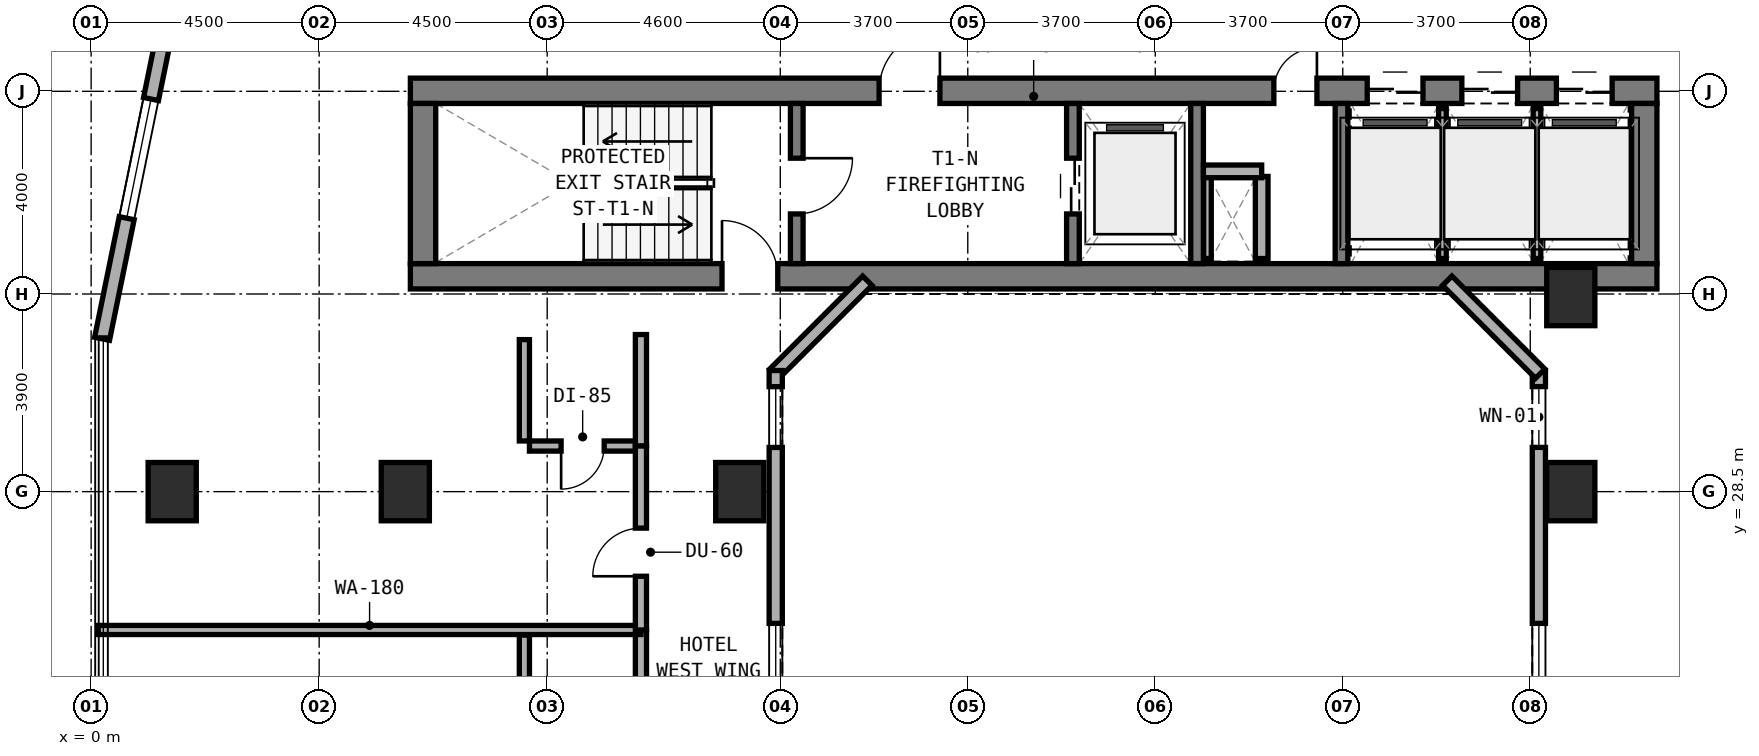
"""IFC4 building model, lengths in metres.
Left out: names, types, materials, properties, quantities, classifications, styles, units other than length and angle.
Written with IfcOpenShell. Run it as: python <this file> out.ifc"""

import sys

from ifc_helpers import new_model, si_unit, direction, frame, frame_2d, origin, origin_2d, place, context, subcontext, project, spatial, rectangle, extrude, element, fill, save


model = new_model("IFC4")
c1 = context("Model", 3, precision=1e-05, world=origin(), true_north=direction((0.0, 1.0)))
c2 = subcontext(c1, "Body", "Model", "MODEL_VIEW")
j1 = project(units=[si_unit("LENGTHUNIT", "METRE"), si_unit("PLANEANGLEUNIT", "RADIAN")], contexts=[c1])
p1 = place(None, origin())
s1 = spatial("IfcSite", under=j1, at=p1, CompositionType="ELEMENT")
p2 = place(p1, origin())
s2 = spatial("IfcBuilding", under=s1, at=p2, CompositionType="ELEMENT")
p3 = place(p2, frame((0.0, 0.0, 62.5)))
s3 = spatial("IfcBuildingStorey", under=s2, at=p3, CompositionType="ELEMENT", Elevation=62.5)
p4 = place(p3, frame((6.3, 32.75, 0.0), z_axis=(0.0, 0.0, 1.0), x_axis=(1.0, 0.0, 0.0)))
e1 = element("IfcWall", 1, at=p4, inside=s3, PredefinedType="SHEAR", context=c2, shape_type="SweptSolid", body=[
    extrude(rectangle(XDim=24.6, YDim=0.5, at=frame_2d((12.3, 0.0))), origin(), (0.0, 0.0, 1.0), 3.5),
])
p5 = place(p4, frame((6.15, 0.0, 0.0)))
e2 = element("IfcOpeningElement", 2, at=p5, cuts=e1, PredefinedType="OPENING", context=c2, shape_type="SweptSolid", body=[
    extrude(rectangle(XDim=1.1, YDim=2.15, at=frame_2d((0.55, 1.075))), frame((0.0, 0.26, 0.0), z_axis=(0.0, -1.0, 0.0), x_axis=(1.0, 0.0, 0.0)), (0.0, 0.0, 1.0), 0.52),
])
p6 = place(p3, frame((6.3, 36.41, 0.0), z_axis=(0.0, 0.0, 1.0), x_axis=(1.0, 0.0, 0.0)))
e3 = element("IfcWall", 3, at=p6, inside=s3, PredefinedType="SHEAR", context=c2, shape_type="SweptSolid", body=[
    extrude(rectangle(XDim=24.6, YDim=0.5, at=frame_2d((12.3, 0.0))), origin(), (0.0, 0.0, 1.0), 3.5),
])
p7 = place(p6, frame((9.25, 0.0, 0.0)))
e4 = element("IfcOpeningElement", 4, at=p7, cuts=e3, PredefinedType="OPENING", context=c2, shape_type="SweptSolid", body=[
    extrude(rectangle(XDim=1.2, YDim=2.15, at=frame_2d((0.6, 1.075))), frame((0.0, 0.26, 0.0), z_axis=(0.0, -1.0, 0.0), x_axis=(1.0, 0.0, 0.0)), (0.0, 0.0, 1.0), 0.52),
])
p8 = place(p6, frame((17.04, 0.0, 0.0)))
e5 = element("IfcOpeningElement", 5, at=p8, cuts=e3, PredefinedType="OPENING", context=c2, shape_type="SweptSolid", body=[
    extrude(rectangle(XDim=0.85, YDim=2.1, at=frame_2d((0.425, 1.05))), frame((0.0, 0.26, 0.0), z_axis=(0.0, -1.0, 0.0), x_axis=(1.0, 0.0, 0.0)), (0.0, 0.0, 1.0), 0.52),
])
p9 = place(p6, frame((18.883, 0.0, 0.0)))
e6 = element("IfcOpeningElement", 6, at=p9, cuts=e3, PredefinedType="OPENING", context=c2, shape_type="SweptSolid", body=[
    extrude(rectangle(XDim=1.1, YDim=2.15, at=frame_2d((0.55, 1.075))), frame((0.0, 0.26, 0.0), z_axis=(0.0, -1.0, 0.0), x_axis=(1.0, 0.0, 0.0)), (0.0, 0.0, 1.0), 0.52),
])
p10 = place(p6, frame((20.75, 0.0, 0.0)))
e7 = element("IfcOpeningElement", 7, at=p10, cuts=e3, PredefinedType="OPENING", context=c2, shape_type="SweptSolid", body=[
    extrude(rectangle(XDim=1.1, YDim=2.15, at=frame_2d((0.55, 1.075))), frame((0.0, 0.26, 0.0), z_axis=(0.0, -1.0, 0.0), x_axis=(1.0, 0.0, 0.0)), (0.0, 0.0, 1.0), 0.52),
])
p11 = place(p6, frame((22.616, 0.0, 0.0)))
e8 = element("IfcOpeningElement", 8, at=p11, cuts=e3, PredefinedType="OPENING", context=c2, shape_type="SweptSolid", body=[
    extrude(rectangle(XDim=1.1, YDim=2.15, at=frame_2d((0.55, 1.075))), frame((0.0, 0.26, 0.0), z_axis=(0.0, -1.0, 0.0), x_axis=(1.0, 0.0, 0.0)), (0.0, 0.0, 1.0), 0.52),
])
for number, where, z_axis, x_axis in (
    (9, (6.55, 33.0, 0.0), (0.0, 0.0, 1.0), (0.0, 1.0, 0.0)),
    (10, (30.65, 33.0, 0.0), (0.0, 0.0, 1.0), (0.0, 1.0, 0.0)),
):
    element("IfcWall", number, at=place(p3, frame(where, z_axis=z_axis, x_axis=x_axis)), inside=s3, PredefinedType="SHEAR", context=c2, shape_type="SweptSolid", body=[
        extrude(rectangle(XDim=3.16, YDim=0.5, at=frame_2d((1.58, 0.0))), origin(), (0.0, 0.0, 1.0), 3.5),
    ])
p12 = place(p3, frame((13.925, 33.0, 0.0), z_axis=(0.0, 0.0, 1.0), x_axis=(0.0, 1.0, 0.0)))
e11 = element("IfcWall", 11, at=p12, inside=s3, PredefinedType="STANDARD", context=c2, shape_type="SweptSolid", body=[
    extrude(rectangle(XDim=3.16, YDim=0.25, at=frame_2d((1.58, 0.0))), origin(), (0.0, 0.0, 1.0), 3.22),
])
p13 = place(p12, frame((0.98, 0.0, 0.0)))
e12 = element("IfcOpeningElement", 12, at=p13, cuts=e11, PredefinedType="OPENING", context=c2, shape_type="SweptSolid", body=[
    extrude(rectangle(XDim=1.1, YDim=2.15, at=frame_2d((0.55, 1.075))), frame((0.0, 0.135, 0.0), z_axis=(0.0, -1.0, 0.0), x_axis=(1.0, 0.0, 0.0)), (0.0, 0.0, 1.0), 0.27),
])
p14 = place(p3, frame((19.375, 33.0, 0.0), z_axis=(0.0, 0.0, 1.0), x_axis=(0.0, 1.0, 0.0)))
e13 = element("IfcWall", 13, at=p14, inside=s3, PredefinedType="STANDARD", context=c2, shape_type="SweptSolid", body=[
    extrude(rectangle(XDim=3.16, YDim=0.25, at=frame_2d((1.58, 0.0))), origin(), (0.0, 0.0, 1.0), 3.22),
])
p15 = place(p14, frame((0.98, 0.0, 0.0)))
e14 = element("IfcOpeningElement", 14, at=p15, cuts=e13, PredefinedType="OPENING", context=c2, shape_type="SweptSolid", body=[
    extrude(rectangle(XDim=1.1, YDim=2.15, at=frame_2d((0.55, 1.075))), frame((0.0, 0.135, 0.0), z_axis=(0.0, -1.0, 0.0), x_axis=(1.0, 0.0, 0.0)), (0.0, 0.0, 1.0), 0.27),
])
for number, where, z_axis, x_axis in (
    (15, (21.825, 33.0, 0.0), (0.0, 0.0, 1.0), (0.0, 1.0, 0.0)),
    (16, (24.675, 33.0, 0.0), (0.0, 0.0, 1.0), (0.0, 1.0, 0.0)),
):
    element("IfcWall", number, at=place(p3, frame(where, z_axis=z_axis, x_axis=x_axis)), inside=s3, PredefinedType="STANDARD", context=c2, shape_type="SweptSolid", body=[
        extrude(rectangle(XDim=3.16, YDim=0.25, at=frame_2d((1.58, 0.0))), origin(), (0.0, 0.0, 1.0), 3.22),
    ])
for number, where, z_axis, x_axis in (
    (17, (6.2, 28.5, 0.0), (0.0, 0.0, 1.0), (1.0, 0.0, 0.0)),
    (18, (12.8, 28.5, 0.0), (0.0, 0.0, 1.0), (1.0, 0.0, 0.0)),
    (19, (29.2, 32.35, 0.0), (0.0, 0.0, 1.0), (1.0, 0.0, 0.0)),
    (20, (29.2, 28.5, 0.0), (0.0, 0.0, 1.0), (1.0, 0.0, 0.0)),
    (21, (1.6, 28.5, 0.0), (0.0, 0.0, 1.0), (1.0, 0.0, 0.0)),
):
    element("IfcColumn", number, at=place(p3, frame(where, z_axis=z_axis, x_axis=x_axis)), inside=s3, PredefinedType="COLUMN", context=c2, shape_type="SweptSolid", body=[
        extrude(rectangle(XDim=0.95, YDim=1.15, at=origin_2d()), origin(), (0.0, 0.0, 1.0), 3.5),
    ])
p16 = place(p3, frame((2.229, 41.378, 0.0), z_axis=(0.0, 0.0, 1.0), x_axis=(-0.199990901713, -0.979797754249, 0.0)))
e22 = element("IfcWall", 22, at=p16, inside=s3, PredefinedType="STANDARD", context=c2, shape_type="SweptSolid", body=[
    extrude(rectangle(XDim=10.065, YDim=0.3, at=frame_2d((5.033, 0.0))), origin(), (0.0, 0.0, 1.0), 3.22),
])
p17 = place(p16, frame((0.378, 0.0, 0.85)))
e23 = element("IfcOpeningElement", 23, at=p17, cuts=e22, PredefinedType="OPENING", context=c2, shape_type="SweptSolid", body=[
    extrude(rectangle(XDim=1.8, YDim=1.5, at=frame_2d((0.9, 0.75))), frame((0.0, 0.16, 0.0), z_axis=(0.0, -1.0, 0.0), x_axis=(1.0, 0.0, 0.0)), (0.0, 0.0, 1.0), 0.32),
])
p18 = place(p16, frame((5.236, 0.0, 0.8)))
e24 = element("IfcOpeningElement", 24, at=p18, cuts=e22, PredefinedType="OPENING", context=c2, shape_type="SweptSolid", body=[
    extrude(rectangle(XDim=2.4, YDim=1.6, at=frame_2d((1.2, 0.8))), frame((0.0, 0.16, 0.0), z_axis=(0.0, -1.0, 0.0), x_axis=(1.0, 0.0, 0.0)), (0.0, 0.0, 1.0), 0.32),
])
p19 = place(p3, frame((28.57, 19.11, 0.0), z_axis=(0.0, 0.0, 1.0), x_axis=(0.0, 1.0, 0.0)))
e25 = element("IfcWall", 25, at=p19, inside=s3, PredefinedType="STANDARD", context=c2, shape_type="SweptSolid", body=[
    extrude(rectangle(XDim=11.78, YDim=0.26, at=frame_2d((5.89, 0.0))), origin(), (0.0, 0.0, 1.0), 3.22),
])
p20 = place(p19, frame((0.318, 0.0, 0.85)))
e26 = element("IfcOpeningElement", 26, at=p20, cuts=e25, PredefinedType="OPENING", context=c2, shape_type="SweptSolid", body=[
    extrude(rectangle(XDim=1.2, YDim=1.5, at=frame_2d((0.6, 0.75))), frame((0.0, 0.14, 0.0), z_axis=(0.0, -1.0, 0.0), x_axis=(1.0, 0.0, 0.0)), (0.0, 0.0, 1.0), 0.28),
])
p21 = place(p19, frame((4.99, 0.0, 0.85)))
e27 = element("IfcOpeningElement", 27, at=p21, cuts=e25, PredefinedType="OPENING", context=c2, shape_type="SweptSolid", body=[
    extrude(rectangle(XDim=1.8, YDim=1.5, at=frame_2d((0.9, 0.75))), frame((0.0, 0.14, 0.0), z_axis=(0.0, -1.0, 0.0), x_axis=(1.0, 0.0, 0.0)), (0.0, 0.0, 1.0), 0.28),
])
p22 = place(p19, frame((10.263, 0.0, 0.85)))
e28 = element("IfcOpeningElement", 28, at=p22, cuts=e25, PredefinedType="OPENING", context=c2, shape_type="SweptSolid", body=[
    extrude(rectangle(XDim=1.2, YDim=1.5, at=frame_2d((0.6, 0.75))), frame((0.0, 0.14, 0.0), z_axis=(0.0, -1.0, 0.0), x_axis=(1.0, 0.0, 0.0)), (0.0, 0.0, 1.0), 0.28),
])
p23 = place(p3, frame((28.596, 30.828, 0.0), z_axis=(0.0, 0.0, 1.0), x_axis=(-0.707059717605, 0.707153841636, 0.0)))
e29 = element("IfcWall", 29, at=p23, inside=s3, PredefinedType="STANDARD", context=c2, shape_type="SweptSolid", body=[
    extrude(rectangle(XDim=2.594, YDim=0.26, at=frame_2d((1.297, 0.0))), origin(), (0.0, 0.0, 1.0), 3.22),
])
p24 = place(p3, frame((15.318, 32.662, 0.0), z_axis=(0.0, 0.0, 1.0), x_axis=(-0.707106781187, -0.707106781187, 0.0)))
e30 = element("IfcWall", 30, at=p24, inside=s3, PredefinedType="STANDARD", context=c2, shape_type="SweptSolid", body=[
    extrude(rectangle(XDim=2.594, YDim=0.26, at=frame_2d((1.297, 0.0))), origin(), (0.0, 0.0, 1.0), 3.22),
])
p25 = place(p3, frame((13.51, 30.89, 0.0), z_axis=(0.0, 0.0, 1.0), x_axis=(0.0, -1.0, 0.0)))
e31 = element("IfcWall", 31, at=p25, inside=s3, PredefinedType="STANDARD", context=c2, shape_type="SweptSolid", body=[
    extrude(rectangle(XDim=11.78, YDim=0.26, at=frame_2d((5.89, 0.0))), origin(), (0.0, 0.0, 1.0), 3.22),
])
p26 = place(p25, frame((0.318, 0.0, 0.85)))
e32 = element("IfcOpeningElement", 32, at=p26, cuts=e31, PredefinedType="OPENING", context=c2, shape_type="SweptSolid", body=[
    extrude(rectangle(XDim=1.2, YDim=1.5, at=frame_2d((0.6, 0.75))), frame((0.0, 0.14, 0.0), z_axis=(0.0, -1.0, 0.0), x_axis=(1.0, 0.0, 0.0)), (0.0, 0.0, 1.0), 0.28),
])
p27 = place(p25, frame((4.99, 0.0, 0.85)))
e33 = element("IfcOpeningElement", 33, at=p27, cuts=e31, PredefinedType="OPENING", context=c2, shape_type="SweptSolid", body=[
    extrude(rectangle(XDim=1.8, YDim=1.5, at=frame_2d((0.9, 0.75))), frame((0.0, 0.14, 0.0), z_axis=(0.0, -1.0, 0.0), x_axis=(1.0, 0.0, 0.0)), (0.0, 0.0, 1.0), 0.28),
])
p28 = place(p25, frame((10.263, 0.0, 0.85)))
e34 = element("IfcOpeningElement", 34, at=p28, cuts=e31, PredefinedType="OPENING", context=c2, shape_type="SweptSolid", body=[
    extrude(rectangle(XDim=1.2, YDim=1.5, at=frame_2d((0.6, 0.75))), frame((0.0, 0.14, 0.0), z_axis=(0.0, -1.0, 0.0), x_axis=(1.0, 0.0, 0.0)), (0.0, 0.0, 1.0), 0.28),
])
p29 = place(p3, frame((22.03, 33.1, 0.0), z_axis=(0.0, 0.0, 1.0), x_axis=(0.0, 1.0, 0.0)))
e35 = element("IfcWall", 35, at=p29, inside=s3, PredefinedType="PARTITIONING", context=c2, shape_type="SweptSolid", body=[
    extrude(rectangle(XDim=1.62, YDim=0.15, at=frame_2d((0.81, 0.0))), origin(), (0.0, 0.0, 1.0), 3.22),
])
p30 = place(p3, frame((23.1, 33.1, 0.0), z_axis=(0.0, 0.0, 1.0), x_axis=(0.0, 1.0, 0.0)))
e36 = element("IfcWall", 36, at=p30, inside=s3, PredefinedType="SOLIDWALL", context=c2, shape_type="SweptSolid", body=[
    extrude(rectangle(XDim=1.62, YDim=0.25, at=frame_2d((0.81, 0.0))), origin(), (0.0, 0.0, 1.0), 3.22),
])
p31 = place(p3, frame((21.95, 34.82, 0.0), z_axis=(0.0, 0.0, 1.0), x_axis=(1.0, 0.0, 0.0)))
e37 = element("IfcWall", 37, at=p31, inside=s3, PredefinedType="SOLIDWALL", context=c2, shape_type="SweptSolid", body=[
    extrude(rectangle(XDim=1.15, YDim=0.25, at=frame_2d((0.575, 0.0))), origin(), (0.0, 0.0, 1.0), 3.22),
])
p32 = place(p3, frame((26.667, 33.1, 0.0), z_axis=(0.0, 0.0, 1.0), x_axis=(0.0, 1.0, 0.0)))
e38 = element("IfcWall", 38, at=p32, inside=s3, PredefinedType="PARTITIONING", context=c2, shape_type="SweptSolid", body=[
    extrude(rectangle(XDim=2.96, YDim=0.15, at=frame_2d((1.48, 0.0))), origin(), (0.0, 0.0, 1.0), 3.22),
])
p33 = place(p3, frame((28.533, 33.1, 0.0), z_axis=(0.0, 0.0, 1.0), x_axis=(0.0, 1.0, 0.0)))
e39 = element("IfcWall", 39, at=p33, inside=s3, PredefinedType="PARTITIONING", context=c2, shape_type="SweptSolid", body=[
    extrude(rectangle(XDim=2.96, YDim=0.15, at=frame_2d((1.48, 0.0))), origin(), (0.0, 0.0, 1.0), 2.495),
])
p34 = place(p3, frame((8.55, 23.67, 0.0), z_axis=(0.0, 0.0, 1.0), x_axis=(0.0, 1.0, 0.0)))
e40 = element("IfcWall", 40, at=p34, inside=s3, PredefinedType="PLUMBINGWALL", context=c2, shape_type="SweptSolid", body=[
    extrude(rectangle(XDim=2.0, YDim=0.2, at=frame_2d((1.0, 0.0))), origin(), (0.0, 0.0, 1.0), 3.22),
])
p35 = place(p3, frame((10.85, 23.57, 0.0), z_axis=(0.0, 0.0, 1.0), x_axis=(0.0, 1.0, 0.0)))
e41 = element("IfcWall", 41, at=p35, inside=s3, PredefinedType="SOLIDWALL", context=c2, shape_type="SweptSolid", body=[
    extrude(rectangle(XDim=2.2, YDim=0.22, at=frame_2d((1.1, 0.0))), origin(), (0.0, 0.0, 1.0), 3.22),
])
p36 = place(p3, frame((0.14, 25.77, 0.0), z_axis=(0.0, 0.0, 1.0), x_axis=(1.0, 0.0, 0.0)))
e42 = element("IfcWall", 42, at=p36, inside=s3, PredefinedType="SOLIDWALL", context=c2, shape_type="SweptSolid", body=[
    extrude(rectangle(XDim=10.71, YDim=0.18, at=frame_2d((5.355, 0.0))), origin(), (0.0, 0.0, 1.0), 2.745),
])
p37 = place(p3, frame((8.65, 29.4, 0.0), z_axis=(0.0, 0.0, 1.0), x_axis=(1.0, 0.0, 0.0)))
e43 = element("IfcWall", 43, at=p37, inside=s3, PredefinedType="PLUMBINGWALL", context=c2, shape_type="SweptSolid", body=[
    extrude(rectangle(XDim=2.1, YDim=0.2, at=frame_2d((1.05, 0.0))), origin(), (0.0, 0.0, 1.0), 3.22),
])
p38 = place(p37, frame((0.625, 0.0, 0.0)))
e44 = element("IfcOpeningElement", 44, at=p38, cuts=e43, PredefinedType="OPENING", context=c2, shape_type="SweptSolid", body=[
    extrude(rectangle(XDim=0.85, YDim=2.1, at=frame_2d((0.425, 1.05))), frame((0.0, 0.11, 0.0), z_axis=(0.0, -1.0, 0.0), x_axis=(1.0, 0.0, 0.0)), (0.0, 0.0, 1.0), 0.22),
])
p39 = place(p3, frame((8.55, 29.5, 0.0), z_axis=(0.0, 0.0, 1.0), x_axis=(0.0, 1.0, 0.0)))
e45 = element("IfcWall", 45, at=p39, inside=s3, PredefinedType="PLUMBINGWALL", context=c2, shape_type="SweptSolid", body=[
    extrude(rectangle(XDim=2.0, YDim=0.2, at=frame_2d((1.0, 0.0))), origin(), (0.0, 0.0, 1.0), 3.22),
])
p40 = place(p3, frame((10.85, 29.4, 0.0), z_axis=(0.0, 0.0, 1.0), x_axis=(0.0, 1.0, 0.0)))
e46 = element("IfcWall", 46, at=p40, inside=s3, PredefinedType="SOLIDWALL", context=c2, shape_type="SweptSolid", body=[
    extrude(rectangle(XDim=2.2, YDim=0.22, at=frame_2d((1.1, 0.0))), origin(), (0.0, 0.0, 1.0), 3.22),
])
p41 = place(p3, frame((10.85, 25.77, 0.0), z_axis=(0.0, 0.0, 1.0), x_axis=(0.0, 1.0, 0.0)))
e47 = element("IfcWall", 47, at=p41, inside=s3, PredefinedType="SOLIDWALL", context=c2, shape_type="SweptSolid", body=[
    extrude(rectangle(XDim=3.63, YDim=0.22, at=frame_2d((1.815, 0.0))), origin(), (0.0, 0.0, 1.0), 2.495),
])
p42 = place(p41, frame((1.06, 0.0, 0.0)))
e48 = element("IfcOpeningElement", 48, at=p42, cuts=e47, PredefinedType="OPENING", context=c2, shape_type="SweptSolid", body=[
    extrude(rectangle(XDim=0.95, YDim=2.1, at=frame_2d((0.475, 1.05))), frame((0.0, 0.12, 0.0), z_axis=(0.0, -1.0, 0.0), x_axis=(1.0, 0.0, 0.0)), (0.0, 0.0, 1.0), 0.24),
])
p43 = place(p18, origin())
e49 = element("IfcWindow", 49, at=p43, inside=s3, PartitioningType="SINGLE_PANEL", PredefinedType="WINDOW", context=c2, shape_type="SweptSolid", body=[
    extrude(rectangle(XDim=2.4, YDim=1.6, at=frame_2d((1.2, 0.8))), frame((0.0, 0.03, 0.0), z_axis=(0.0, -1.0, 0.0), x_axis=(1.0, 0.0, 0.0)), (0.0, 0.0, 1.0), 0.06),
])
fill(e24, e49)
p44 = place(p21, origin())
e50 = element("IfcWindow", 50, at=p44, inside=s3, PartitioningType="SINGLE_PANEL", PredefinedType="WINDOW", context=c2, shape_type="SweptSolid", body=[
    extrude(rectangle(XDim=1.8, YDim=1.5, at=frame_2d((0.9, 0.75))), frame((0.0, 0.03, 0.0), z_axis=(0.0, -1.0, 0.0), x_axis=(1.0, 0.0, 0.0)), (0.0, 0.0, 1.0), 0.06),
])
fill(e27, e50)
p45 = place(p22, origin())
e51 = element("IfcWindow", 51, at=p45, inside=s3, PartitioningType="SINGLE_PANEL", PredefinedType="WINDOW", context=c2, shape_type="SweptSolid", body=[
    extrude(rectangle(XDim=1.2, YDim=1.5, at=frame_2d((0.6, 0.75))), frame((0.0, 0.03, 0.0), z_axis=(0.0, -1.0, 0.0), x_axis=(1.0, 0.0, 0.0)), (0.0, 0.0, 1.0), 0.06),
])
fill(e28, e51)
p46 = place(p26, origin())
e52 = element("IfcWindow", 52, at=p46, inside=s3, PartitioningType="SINGLE_PANEL", PredefinedType="WINDOW", context=c2, shape_type="SweptSolid", body=[
    extrude(rectangle(XDim=1.2, YDim=1.5, at=frame_2d((0.6, 0.75))), frame((0.0, 0.03, 0.0), z_axis=(0.0, -1.0, 0.0), x_axis=(1.0, 0.0, 0.0)), (0.0, 0.0, 1.0), 0.06),
])
fill(e32, e52)
p47 = place(p27, origin())
e53 = element("IfcWindow", 53, at=p47, inside=s3, PartitioningType="SINGLE_PANEL", PredefinedType="WINDOW", context=c2, shape_type="SweptSolid", body=[
    extrude(rectangle(XDim=1.8, YDim=1.5, at=frame_2d((0.9, 0.75))), frame((0.0, 0.03, 0.0), z_axis=(0.0, -1.0, 0.0), x_axis=(1.0, 0.0, 0.0)), (0.0, 0.0, 1.0), 0.06),
])
fill(e33, e53)
p48 = place(p13, frame((1.1, 0.0, 0.0), z_axis=(0.0, 0.0, 1.0), x_axis=(-1.0, 0.0, 0.0)))
e54 = element("IfcDoor", 54, at=p48, inside=s3, OperationType="SINGLE_SWING_LEFT", PredefinedType="DOOR", context=c2, shape_type="SweptSolid", body=[
    extrude(rectangle(XDim=1.1, YDim=2.15, at=frame_2d((0.55, 1.075))), frame((0.0, 0.025, 0.0), z_axis=(0.0, -1.0, 0.0), x_axis=(1.0, 0.0, 0.0)), (0.0, 0.0, 1.0), 0.05),
])
fill(e12, e54)
p49 = place(p7, origin())
e55 = element("IfcDoor", 55, at=p49, inside=s3, OperationType="SINGLE_SWING_RIGHT", PredefinedType="DOOR", context=c2, shape_type="SweptSolid", body=[
    extrude(rectangle(XDim=1.2, YDim=2.15, at=frame_2d((0.6, 1.075))), frame((0.0, 0.025, 0.0), z_axis=(0.0, -1.0, 0.0), x_axis=(1.0, 0.0, 0.0)), (0.0, 0.0, 1.0), 0.05),
])
fill(e4, e55)
p50 = place(p15, origin())
e56 = element("IfcDoor", 56, at=p50, inside=s3, OperationType="DOUBLE_DOOR_SLIDING", PredefinedType="DOOR", context=c2, shape_type="SweptSolid", body=[
    extrude(rectangle(XDim=1.1, YDim=2.15, at=frame_2d((0.55, 1.075))), frame((0.0, 0.025, 0.0), z_axis=(0.0, -1.0, 0.0), x_axis=(1.0, 0.0, 0.0)), (0.0, 0.0, 1.0), 0.05),
])
fill(e14, e56)
p51 = place(p8, origin())
e57 = element("IfcDoor", 57, at=p51, inside=s3, OperationType="SINGLE_SWING_RIGHT", PredefinedType="DOOR", context=c2, shape_type="SweptSolid", body=[
    extrude(rectangle(XDim=0.85, YDim=2.1, at=frame_2d((0.425, 1.05))), frame((0.0, 0.025, 0.0), z_axis=(0.0, -1.0, 0.0), x_axis=(1.0, 0.0, 0.0)), (0.0, 0.0, 1.0), 0.05),
])
fill(e5, e57)
p52 = place(p9, origin())
e58 = element("IfcDoor", 58, at=p52, inside=s3, OperationType="DOUBLE_DOOR_SLIDING", PredefinedType="DOOR", context=c2, shape_type="SweptSolid", body=[
    extrude(rectangle(XDim=1.1, YDim=2.15, at=frame_2d((0.55, 1.075))), frame((0.0, 0.025, 0.0), z_axis=(0.0, -1.0, 0.0), x_axis=(1.0, 0.0, 0.0)), (0.0, 0.0, 1.0), 0.05),
])
fill(e6, e58)
p53 = place(p10, origin())
e59 = element("IfcDoor", 59, at=p53, inside=s3, OperationType="DOUBLE_DOOR_SLIDING", PredefinedType="DOOR", context=c2, shape_type="SweptSolid", body=[
    extrude(rectangle(XDim=1.1, YDim=2.15, at=frame_2d((0.55, 1.075))), frame((0.0, 0.025, 0.0), z_axis=(0.0, -1.0, 0.0), x_axis=(1.0, 0.0, 0.0)), (0.0, 0.0, 1.0), 0.05),
])
fill(e7, e59)
p54 = place(p11, origin())
e60 = element("IfcDoor", 60, at=p54, inside=s3, OperationType="DOUBLE_DOOR_SLIDING", PredefinedType="DOOR", context=c2, shape_type="SweptSolid", body=[
    extrude(rectangle(XDim=1.1, YDim=2.15, at=frame_2d((0.55, 1.075))), frame((0.0, 0.025, 0.0), z_axis=(0.0, -1.0, 0.0), x_axis=(1.0, 0.0, 0.0)), (0.0, 0.0, 1.0), 0.05),
])
fill(e8, e60)
p55 = place(p5, origin())
e61 = element("IfcDoor", 61, at=p55, inside=s3, OperationType="SINGLE_SWING_LEFT", PredefinedType="DOOR", context=c2, shape_type="SweptSolid", body=[
    extrude(rectangle(XDim=1.1, YDim=2.15, at=frame_2d((0.55, 1.075))), frame((0.0, 0.025, 0.0), z_axis=(0.0, -1.0, 0.0), x_axis=(1.0, 0.0, 0.0)), (0.0, 0.0, 1.0), 0.05),
])
fill(e2, e61)
p56 = place(p38, frame((0.85, 0.0, 0.0), z_axis=(0.0, 0.0, 1.0), x_axis=(-1.0, 0.0, 0.0)))
e62 = element("IfcDoor", 62, at=p56, inside=s3, OperationType="SINGLE_SWING_RIGHT", PredefinedType="DOOR", context=c2, shape_type="SweptSolid", body=[
    extrude(rectangle(XDim=0.85, YDim=2.1, at=frame_2d((0.425, 1.05))), frame((0.0, 0.025, 0.0), z_axis=(0.0, -1.0, 0.0), x_axis=(1.0, 0.0, 0.0)), (0.0, 0.0, 1.0), 0.05),
])
fill(e44, e62)
p57 = place(p42, origin())
e63 = element("IfcDoor", 63, at=p57, inside=s3, OperationType="SINGLE_SWING_LEFT", PredefinedType="DOOR", context=c2, shape_type="SweptSolid", body=[
    extrude(rectangle(XDim=0.95, YDim=2.1, at=frame_2d((0.475, 1.05))), frame((0.0, 0.025, 0.0), z_axis=(0.0, -1.0, 0.0), x_axis=(1.0, 0.0, 0.0)), (0.0, 0.0, 1.0), 0.05),
])
fill(e48, e63)
save(model, sys.argv[1])
